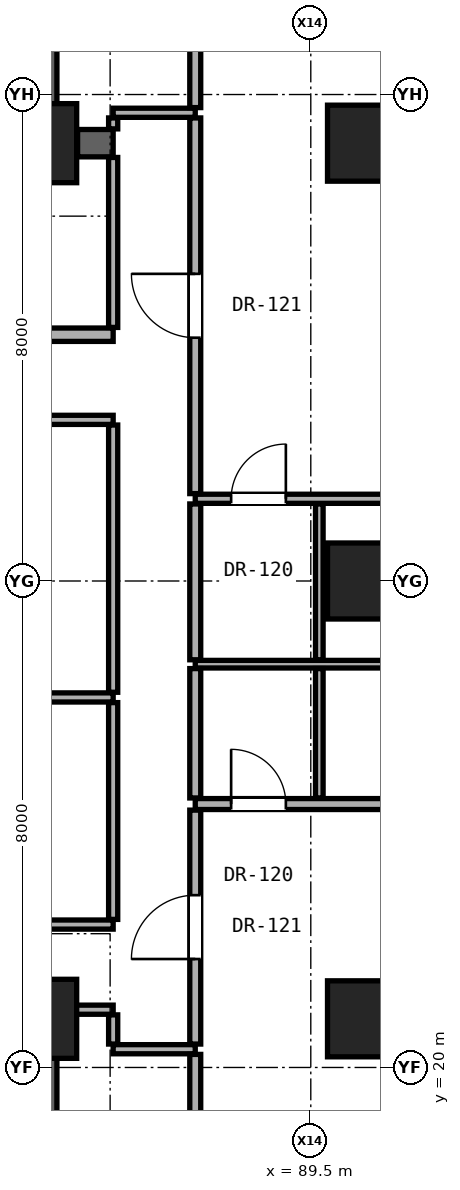
"""IFC4 building model, lengths in metres.
Left out: names, types, materials, properties, quantities, classifications, styles, units other than length and angle.
Written with IfcOpenShell. Run it as: python <this file> out.ifc"""

import sys

from ifc_helpers import new_model, si_unit, direction, frame, frame_2d, origin, origin_2d, place, context, subcontext, project, spatial, rectangle, hollow_rectangle, extrude, element, fill, save


model = new_model("IFC4")
c1 = context("Model", 3, precision=1e-05, world=origin(), true_north=direction((0.0, 1.0)))
c2 = subcontext(c1, "Body", "Model", "MODEL_VIEW")
j1 = project(units=[si_unit("LENGTHUNIT", "METRE"), si_unit("PLANEANGLEUNIT", "RADIAN")], contexts=[c1])
p1 = place(None, origin())
s1 = spatial("IfcSite", under=j1, at=p1, CompositionType="ELEMENT")
p2 = place(p1, origin())
s2 = spatial("IfcBuilding", under=s1, at=p2, CompositionType="ELEMENT")
p3 = place(p2, frame((0.0, 0.0, 68.6)))
s3 = spatial("IfcBuildingStorey", under=s2, at=p3, CompositionType="ELEMENT", Elevation=68.6)
for number, where, z_axis, x_axis in (
    (1, (85.0, 20.8, 0.0), (0.0, 0.0, 1.0), (1.0, 0.0, 0.0)),
    (2, (85.0, 35.2, 0.0), (0.0, 0.0, 1.0), (1.0, 0.0, 0.0)),
):
    element("IfcColumn", number, at=place(p3, frame(where, z_axis=z_axis, x_axis=x_axis)), inside=s3, PredefinedType="COLUMN", context=c2, shape_type="SweptSolid", body=[
        extrude(rectangle(XDim=1.3, YDim=1.3, at=origin_2d()), origin(), (0.0, 0.0, 1.0), 3.3),
    ])
for number, where, z_axis, x_axis in (
    (3, (90.4, 20.8, 0.0), (0.0, 0.0, 1.0), (1.0, 0.0, 0.0)),
    (4, (90.4, 28.0, 0.0), (0.0, 0.0, 1.0), (1.0, 0.0, 0.0)),
    (5, (90.4, 35.2, 0.0), (0.0, 0.0, 1.0), (1.0, 0.0, 0.0)),
):
    element("IfcColumn", number, at=place(p3, frame(where, z_axis=z_axis, x_axis=x_axis)), inside=s3, PredefinedType="COLUMN", context=c2, shape_type="SweptSolid", body=[
        extrude(hollow_rectangle(XDim=1.25, YDim=1.25, WallThickness=0.07, at=origin_2d()), origin(), (0.0, 0.0, 1.0), 3.3),
    ])
for number, where, z_axis, x_axis in (
    (6, (85.0, 35.2, 0.0), (0.0, 0.0, 1.0), (0.0, 1.0, 0.0)),
    (7, (85.0, 15.2, 0.0), (0.0, 0.0, 1.0), (0.0, 1.0, 0.0)),
):
    element("IfcWall", number, at=place(p3, frame(where, z_axis=z_axis, x_axis=x_axis)), inside=s3, PredefinedType="SHEAR", context=c2, shape_type="SweptSolid", body=[
        extrude(rectangle(XDim=5.6, YDim=0.65, at=frame_2d((2.8, 0.0))), origin(), (0.0, 0.0, 1.0), 3.06),
    ])
p4 = place(p3, frame((86.25, 20.3, 0.0), z_axis=(0.0, 0.0, 1.0), x_axis=(1.0, 0.0, 0.0)))
e8 = element("IfcWall", 8, at=p4, inside=s3, PredefinedType="PARTITIONING", context=c2, shape_type="SweptSolid", body=[
    extrude(rectangle(XDim=1.35, YDim=0.15, at=frame_2d((0.675, 0.0))), origin(), (0.0, 0.0, 1.0), 3.06),
])
p5 = place(p3, frame((85.32, 20.95, 0.0), z_axis=(0.0, 0.0, 1.0), x_axis=(1.0, 0.0, 0.0)))
e9 = element("IfcWall", 9, at=p5, inside=s3, PredefinedType="PARTITIONING", context=c2, shape_type="SweptSolid", body=[
    extrude(rectangle(XDim=0.93, YDim=0.15, at=frame_2d((0.465, 0.0))), origin(), (0.0, 0.0, 1.0), 2.452),
])
p6 = place(p3, frame((66.62, 22.35, 0.0), z_axis=(0.0, 0.0, 1.0), x_axis=(1.0, 0.0, 0.0)))
e10 = element("IfcWall", 10, at=p6, inside=s3, PredefinedType="PARTITIONING", context=c2, shape_type="SweptSolid", body=[
    extrude(rectangle(XDim=19.63, YDim=0.15, at=frame_2d((9.815, 0.0))), origin(), (0.0, 0.0, 1.0), 2.125),
])
p7 = place(p6, frame((8.981, 0.0, 0.0)))
e11 = element("IfcOpeningElement", 11, at=p7, cuts=e10, PredefinedType="OPENING", context=c2, shape_type="SweptSolid", body=[
    extrude(rectangle(XDim=0.85, YDim=2.01, at=frame_2d((0.425, 1.005))), frame((0.0, 0.085, 0.0), z_axis=(0.0, -1.0, 0.0), x_axis=(1.0, 0.0, 0.0)), (0.0, 0.0, 1.0), 0.17),
])
p8 = place(p6, frame((16.061, 0.0, 0.0)))
e12 = element("IfcOpeningElement", 12, at=p8, cuts=e10, PredefinedType="OPENING", context=c2, shape_type="SweptSolid", body=[
    extrude(rectangle(XDim=0.85, YDim=2.01, at=frame_2d((0.425, 1.005))), frame((0.0, 0.085, 0.0), z_axis=(0.0, -1.0, 0.0), x_axis=(1.0, 0.0, 0.0)), (0.0, 0.0, 1.0), 0.17),
])
p9 = place(p3, frame((87.6, 24.332, 0.0), z_axis=(0.0, 0.0, 1.0), x_axis=(1.0, 0.0, 0.0)))
e13 = element("IfcWall", 13, at=p9, inside=s3, PredefinedType="PARTITIONING", context=c2, shape_type="SweptSolid", body=[
    extrude(rectangle(XDim=7.53, YDim=0.18, at=frame_2d((3.765, 0.0))), origin(), (0.0, 0.0, 1.0), 2.196),
])
p10 = place(p9, frame((4.29, 0.0, 0.0)))
e14 = element("IfcOpeningElement", 14, at=p10, cuts=e13, PredefinedType="OPENING", context=c2, shape_type="SweptSolid", body=[
    extrude(rectangle(XDim=0.95, YDim=2.15, at=frame_2d((0.475, 1.075))), frame((0.0, 0.1, 0.0), z_axis=(0.0, -1.0, 0.0), x_axis=(1.0, 0.0, 0.0)), (0.0, 0.0, 1.0), 0.2),
])
p11 = place(p9, frame((0.59, 0.0, 0.0)))
e15 = element("IfcOpeningElement", 15, at=p11, cuts=e13, PredefinedType="OPENING", context=c2, shape_type="SweptSolid", body=[
    extrude(rectangle(XDim=0.9, YDim=2.1, at=frame_2d((0.45, 1.05))), frame((0.0, 0.1, 0.0), z_axis=(0.0, -1.0, 0.0), x_axis=(1.0, 0.0, 0.0)), (0.0, 0.0, 1.0), 0.2),
])
p12 = place(p3, frame((72.05, 26.085, 0.0), z_axis=(0.0, 0.0, 1.0), x_axis=(1.0, 0.0, 0.0)))
e16 = element("IfcWall", 16, at=p12, inside=s3, PredefinedType="PARTITIONING", context=c2, shape_type="SweptSolid", body=[
    extrude(rectangle(XDim=14.2, YDim=0.15, at=frame_2d((7.1, 0.0))), origin(), (0.0, 0.0, 1.0), 2.125),
])
p13 = place(p3, frame((87.6, 26.632, 0.0), z_axis=(0.0, 0.0, 1.0), x_axis=(1.0, 0.0, 0.0)))
e17 = element("IfcWall", 17, at=p13, inside=s3, PredefinedType="PARTITIONING", context=c2, shape_type="SweptSolid", body=[
    extrude(rectangle(XDim=7.53, YDim=0.125, at=frame_2d((3.765, 0.0))), origin(), (0.0, 0.0, 1.0), 2.196),
])
p14 = place(p3, frame((87.6, 29.352, 0.0), z_axis=(0.0, 0.0, 1.0), x_axis=(1.0, 0.0, 0.0)))
e18 = element("IfcWall", 18, at=p14, inside=s3, PredefinedType="PARTITIONING", context=c2, shape_type="SweptSolid", body=[
    extrude(rectangle(XDim=7.53, YDim=0.15, at=frame_2d((3.765, 0.0))), origin(), (0.0, 0.0, 1.0), 2.196),
])
p15 = place(p14, frame((4.29, 0.0, 0.0)))
e19 = element("IfcOpeningElement", 19, at=p15, cuts=e18, PredefinedType="OPENING", context=c2, shape_type="SweptSolid", body=[
    extrude(rectangle(XDim=0.95, YDim=2.15, at=frame_2d((0.475, 1.075))), frame((0.0, 0.085, 0.0), z_axis=(0.0, -1.0, 0.0), x_axis=(1.0, 0.0, 0.0)), (0.0, 0.0, 1.0), 0.17),
])
p16 = place(p14, frame((0.59, 0.0, 0.0)))
e20 = element("IfcOpeningElement", 20, at=p16, cuts=e18, PredefinedType="OPENING", context=c2, shape_type="SweptSolid", body=[
    extrude(rectangle(XDim=0.9, YDim=2.1, at=frame_2d((0.45, 1.05))), frame((0.0, 0.085, 0.0), z_axis=(0.0, -1.0, 0.0), x_axis=(1.0, 0.0, 0.0)), (0.0, 0.0, 1.0), 0.17),
])
p17 = place(p3, frame((66.62, 30.65, 0.0), z_axis=(0.0, 0.0, 1.0), x_axis=(1.0, 0.0, 0.0)))
e21 = element("IfcWall", 21, at=p17, inside=s3, PredefinedType="PARTITIONING", context=c2, shape_type="SweptSolid", body=[
    extrude(rectangle(XDim=19.63, YDim=0.15, at=frame_2d((9.815, 0.0))), origin(), (0.0, 0.0, 1.0), 2.125),
])
p18 = place(p17, frame((3.855, 0.0, 0.0)))
e22 = element("IfcOpeningElement", 22, at=p18, cuts=e21, PredefinedType="OPENING", context=c2, shape_type="SweptSolid", body=[
    extrude(rectangle(XDim=0.85, YDim=2.01, at=frame_2d((0.425, 1.005))), frame((0.0, 0.085, 0.0), z_axis=(0.0, -1.0, 0.0), x_axis=(1.0, 0.0, 0.0)), (0.0, 0.0, 1.0), 0.17),
])
p19 = place(p17, frame((8.981, 0.0, 0.0)))
e23 = element("IfcOpeningElement", 23, at=p19, cuts=e21, PredefinedType="OPENING", context=c2, shape_type="SweptSolid", body=[
    extrude(rectangle(XDim=0.85, YDim=2.01, at=frame_2d((0.425, 1.005))), frame((0.0, 0.085, 0.0), z_axis=(0.0, -1.0, 0.0), x_axis=(1.0, 0.0, 0.0)), (0.0, 0.0, 1.0), 0.17),
])
p20 = place(p17, frame((16.061, 0.0, 0.0)))
e24 = element("IfcOpeningElement", 24, at=p20, cuts=e21, PredefinedType="OPENING", context=c2, shape_type="SweptSolid", body=[
    extrude(rectangle(XDim=0.85, YDim=2.01, at=frame_2d((0.425, 1.005))), frame((0.0, 0.085, 0.0), z_axis=(0.0, -1.0, 0.0), x_axis=(1.0, 0.0, 0.0)), (0.0, 0.0, 1.0), 0.17),
])
p21 = place(p3, frame((71.55, 32.05, 0.0), z_axis=(0.0, 0.0, 1.0), x_axis=(1.0, 0.0, 0.0)))
e25 = element("IfcWall", 25, at=p21, inside=s3, PredefinedType="SOLIDWALL", context=c2, shape_type="SweptSolid", body=[
    extrude(rectangle(XDim=14.7, YDim=0.22, at=frame_2d((7.35, 0.0))), origin(), (0.0, 0.0, 1.0), 2.125),
])
p22 = place(p21, frame((11.39, 0.0, 0.0)))
e26 = element("IfcOpeningElement", 26, at=p22, cuts=e25, PredefinedType="OPENING", context=c2, shape_type="SweptSolid", body=[
    extrude(rectangle(XDim=0.85, YDim=2.01, at=frame_2d((0.425, 1.005))), frame((0.0, 0.12, 0.0), z_axis=(0.0, -1.0, 0.0), x_axis=(1.0, 0.0, 0.0)), (0.0, 0.0, 1.0), 0.24),
])
p23 = place(p21, frame((6.065, 0.0, 0.0)))
e27 = element("IfcOpeningElement", 27, at=p23, cuts=e25, PredefinedType="OPENING", context=c2, shape_type="SweptSolid", body=[
    extrude(rectangle(XDim=0.85, YDim=2.01, at=frame_2d((0.425, 1.005))), frame((0.0, 0.12, 0.0), z_axis=(0.0, -1.0, 0.0), x_axis=(1.0, 0.0, 0.0)), (0.0, 0.0, 1.0), 0.24),
])
p24 = place(p21, frame((1.65, 0.0, 0.0)))
e28 = element("IfcOpeningElement", 28, at=p24, cuts=e25, PredefinedType="OPENING", context=c2, shape_type="SweptSolid", body=[
    extrude(rectangle(XDim=0.85, YDim=2.01, at=frame_2d((0.425, 1.005))), frame((0.0, 0.12, 0.0), z_axis=(0.0, -1.0, 0.0), x_axis=(1.0, 0.0, 0.0)), (0.0, 0.0, 1.0), 0.24),
])
p25 = place(p3, frame((85.665, 35.2, 0.0), z_axis=(0.0, 0.0, 1.0), x_axis=(1.0, 0.0, 0.0)))
e29 = element("IfcWall", 29, at=p25, inside=s3, PredefinedType="SHEAR", context=c2, shape_type="SweptSolid", body=[
    extrude(rectangle(XDim=0.585, YDim=0.45, at=frame_2d((0.292, 0.0))), origin(), (0.0, 0.0, 1.0), 3.06),
])
p26 = place(p3, frame((86.25, 35.7, 0.0), z_axis=(0.0, 0.0, 1.0), x_axis=(1.0, 0.0, 0.0)))
e30 = element("IfcWall", 30, at=p26, inside=s3, PredefinedType="PARTITIONING", context=c2, shape_type="SweptSolid", body=[
    extrude(rectangle(XDim=1.35, YDim=0.15, at=frame_2d((0.675, 0.0))), origin(), (0.0, 0.0, 1.0), 3.06),
])
p27 = place(p3, frame((86.25, 20.385, 0.0), z_axis=(0.0, 0.0, 1.0), x_axis=(0.0, 1.0, 0.0)))
e31 = element("IfcWall", 31, at=p27, inside=s3, PredefinedType="PARTITIONING", context=c2, shape_type="SweptSolid", body=[
    extrude(rectangle(XDim=0.48, YDim=0.15, at=frame_2d((0.24, 0.0))), origin(), (0.0, 0.0, 1.0), 2.452),
])
p28 = place(p3, frame((86.25, 22.435, 0.0), z_axis=(0.0, 0.0, 1.0), x_axis=(0.0, 1.0, 0.0)))
e32 = element("IfcWall", 32, at=p28, inside=s3, PredefinedType="PARTITIONING", context=c2, shape_type="SweptSolid", body=[
    extrude(rectangle(XDim=3.565, YDim=0.15, at=frame_2d((1.782, 0.0))), origin(), (0.0, 0.0, 1.0), 3.06),
])
p29 = place(p3, frame((86.25, 26.17, 0.0), z_axis=(0.0, 0.0, 1.0), x_axis=(0.0, 1.0, 0.0)))
e33 = element("IfcWall", 33, at=p29, inside=s3, PredefinedType="PARTITIONING", context=c2, shape_type="SweptSolid", body=[
    extrude(rectangle(XDim=4.395, YDim=0.15, at=frame_2d((2.198, 0.0))), origin(), (0.0, 0.0, 1.0), 2.279),
])
p30 = place(p3, frame((86.25, 32.17, 0.0), z_axis=(0.0, 0.0, 1.0), x_axis=(0.0, 1.0, 0.0)))
e34 = element("IfcWall", 34, at=p30, inside=s3, PredefinedType="PARTITIONING", context=c2, shape_type="SweptSolid", body=[
    extrude(rectangle(XDim=2.795, YDim=0.15, at=frame_2d((1.397, 0.0))), origin(), (0.0, 0.0, 1.0), 2.452),
])
p31 = place(p3, frame((86.25, 35.435, 0.0), z_axis=(0.0, 0.0, 1.0), x_axis=(0.0, 1.0, 0.0)))
e35 = element("IfcWall", 35, at=p31, inside=s3, PredefinedType="PARTITIONING", context=c2, shape_type="SweptSolid", body=[
    extrude(rectangle(XDim=0.18, YDim=0.15, at=frame_2d((0.09, 0.0))), origin(), (0.0, 0.0, 1.0), 2.452),
])
p32 = place(p3, frame((87.6, 16.454, 0.0), z_axis=(0.0, 0.0, 1.0), x_axis=(0.0, 1.0, 0.0)))
e36 = element("IfcWall", 36, at=p32, inside=s3, PredefinedType="PARTITIONING", context=c2, shape_type="SweptSolid", body=[
    extrude(rectangle(XDim=3.761, YDim=0.18, at=frame_2d((1.88, 0.0))), origin(), (0.0, 0.0, 1.0), 2.436),
])
p33 = place(p3, frame((87.6, 20.385, 0.0), z_axis=(0.0, 0.0, 1.0), x_axis=(0.0, 1.0, 0.0)))
e37 = element("IfcWall", 37, at=p33, inside=s3, PredefinedType="PARTITIONING", context=c2, shape_type="SweptSolid", body=[
    extrude(rectangle(XDim=3.847, YDim=0.18, at=frame_2d((1.923, 0.0))), origin(), (0.0, 0.0, 1.0), 2.452),
])
p34 = place(p33, frame((1.398, 0.0, 0.0)))
e38 = element("IfcOpeningElement", 38, at=p34, cuts=e37, PredefinedType="OPENING", context=c2, shape_type="SweptSolid", body=[
    extrude(rectangle(XDim=1.05, YDim=2.2, at=frame_2d((0.525, 1.1))), frame((0.0, 0.1, 0.0), z_axis=(0.0, -1.0, 0.0), x_axis=(1.0, 0.0, 0.0)), (0.0, 0.0, 1.0), 0.2),
])
p35 = place(p3, frame((87.6, 24.432, 0.0), z_axis=(0.0, 0.0, 1.0), x_axis=(0.0, 1.0, 0.0)))
e39 = element("IfcWall", 39, at=p35, inside=s3, PredefinedType="PARTITIONING", context=c2, shape_type="SweptSolid", body=[
    extrude(rectangle(XDim=2.128, YDim=0.18, at=frame_2d((1.064, 0.0))), origin(), (0.0, 0.0, 1.0), 3.06),
])
p36 = place(p3, frame((87.6, 26.705, 0.0), z_axis=(0.0, 0.0, 1.0), x_axis=(0.0, 1.0, 0.0)))
e40 = element("IfcWall", 40, at=p36, inside=s3, PredefinedType="PARTITIONING", context=c2, shape_type="SweptSolid", body=[
    extrude(rectangle(XDim=2.562, YDim=0.18, at=frame_2d((1.281, 0.0))), origin(), (0.0, 0.0, 1.0), 2.279),
])
p37 = place(p3, frame((87.6, 29.437, 0.0), z_axis=(0.0, 0.0, 1.0), x_axis=(0.0, 1.0, 0.0)))
e41 = element("IfcWall", 41, at=p37, inside=s3, PredefinedType="PARTITIONING", context=c2, shape_type="SweptSolid", body=[
    extrude(rectangle(XDim=6.178, YDim=0.18, at=frame_2d((3.089, 0.0))), origin(), (0.0, 0.0, 1.0), 2.452),
])
p38 = place(p37, frame((2.564, 0.0, 0.0)))
e42 = element("IfcOpeningElement", 42, at=p38, cuts=e41, PredefinedType="OPENING", context=c2, shape_type="SweptSolid", body=[
    extrude(rectangle(XDim=1.05, YDim=2.2, at=frame_2d((0.525, 1.1))), frame((0.0, 0.1, 0.0), z_axis=(0.0, -1.0, 0.0), x_axis=(1.0, 0.0, 0.0)), (0.0, 0.0, 1.0), 0.2),
])
p39 = place(p3, frame((87.6, 35.785, 0.0), z_axis=(0.0, 0.0, 1.0), x_axis=(0.0, 1.0, 0.0)))
e43 = element("IfcWall", 43, at=p39, inside=s3, PredefinedType="PARTITIONING", context=c2, shape_type="SweptSolid", body=[
    extrude(rectangle(XDim=3.777, YDim=0.18, at=frame_2d((1.889, 0.0))), origin(), (0.0, 0.0, 1.0), 2.436),
])
p40 = place(p3, frame((89.64, 24.432, 0.0), z_axis=(0.0, 0.0, 1.0), x_axis=(0.0, 1.0, 0.0)))
e44 = element("IfcWall", 44, at=p40, inside=s3, PredefinedType="PARTITIONING", context=c2, shape_type="SweptSolid", body=[
    extrude(rectangle(XDim=2.128, YDim=0.125, at=frame_2d((1.064, 0.0))), origin(), (0.0, 0.0, 1.0), 3.06),
])
p41 = place(p3, frame((89.64, 26.705, 0.0), z_axis=(0.0, 0.0, 1.0), x_axis=(0.0, 1.0, 0.0)))
e45 = element("IfcWall", 45, at=p41, inside=s3, PredefinedType="PARTITIONING", context=c2, shape_type="SweptSolid", body=[
    extrude(rectangle(XDim=2.562, YDim=0.125, at=frame_2d((1.281, 0.0))), origin(), (0.0, 0.0, 1.0), 2.279),
])
p42 = place(p34, origin())
e46 = element("IfcDoor", 46, at=p42, inside=s3, OperationType="SINGLE_SWING_LEFT", PredefinedType="DOOR", context=c2, shape_type="SweptSolid", body=[
    extrude(rectangle(XDim=1.05, YDim=2.2, at=frame_2d((0.525, 1.1))), frame((0.0, 0.025, 0.0), z_axis=(0.0, -1.0, 0.0), x_axis=(1.0, 0.0, 0.0)), (0.0, 0.0, 1.0), 0.05),
])
fill(e38, e46)
p43 = place(p11, origin())
e47 = element("IfcDoor", 47, at=p43, inside=s3, OperationType="SINGLE_SWING_LEFT", PredefinedType="DOOR", context=c2, shape_type="SweptSolid", body=[
    extrude(rectangle(XDim=0.9, YDim=2.1, at=frame_2d((0.45, 1.05))), frame((0.0, 0.025, 0.0), z_axis=(0.0, -1.0, 0.0), x_axis=(1.0, 0.0, 0.0)), (0.0, 0.0, 1.0), 0.05),
])
fill(e15, e47)
p44 = place(p38, origin())
e48 = element("IfcDoor", 48, at=p44, inside=s3, OperationType="SINGLE_SWING_RIGHT", PredefinedType="DOOR", context=c2, shape_type="SweptSolid", body=[
    extrude(rectangle(XDim=1.05, YDim=2.2, at=frame_2d((0.525, 1.1))), frame((0.0, 0.025, 0.0), z_axis=(0.0, -1.0, 0.0), x_axis=(1.0, 0.0, 0.0)), (0.0, 0.0, 1.0), 0.05),
])
fill(e42, e48)
p45 = place(p16, origin())
e49 = element("IfcDoor", 49, at=p45, inside=s3, OperationType="SINGLE_SWING_RIGHT", PredefinedType="DOOR", context=c2, shape_type="SweptSolid", body=[
    extrude(rectangle(XDim=0.9, YDim=2.1, at=frame_2d((0.45, 1.05))), frame((0.0, 0.025, 0.0), z_axis=(0.0, -1.0, 0.0), x_axis=(1.0, 0.0, 0.0)), (0.0, 0.0, 1.0), 0.05),
])
fill(e20, e49)
save(model, sys.argv[1])
